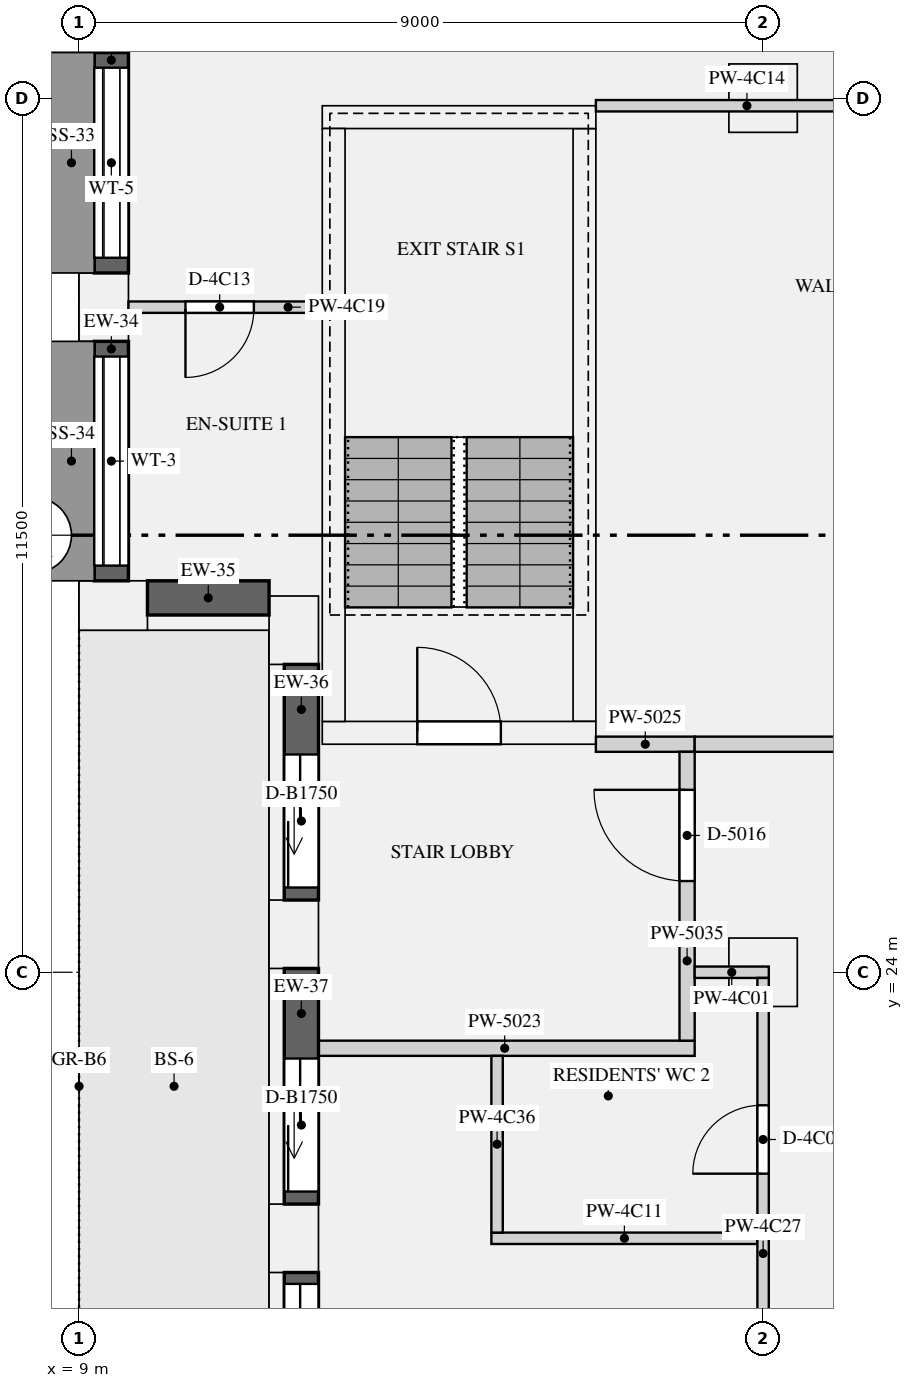
"""IFC4 building model, lengths in metres.
Left out: names, types, materials, properties, quantities, classifications, styles, units other than length and angle.
Written with IfcOpenShell. Run it as: python <this file> out.ifc"""

import sys

from ifc_helpers import new_model, si_unit, direction, frame, frame_2d, origin, origin_2d, place, context, subcontext, project, spatial, rectangle, extrude, element, fill, save


model = new_model("IFC4")
c1 = context("Model", 3, precision=1e-05, world=origin(), true_north=direction((0.0, 1.0)))
c2 = subcontext(c1, "Body", "Model", "MODEL_VIEW")
j1 = project(units=[si_unit("LENGTHUNIT", "METRE"), si_unit("PLANEANGLEUNIT", "RADIAN")], contexts=[c1])
p1 = place(None, origin())
s1 = spatial("IfcSite", under=j1, at=p1, CompositionType="ELEMENT")
p2 = place(p1, origin())
s2 = spatial("IfcBuilding", under=s1, at=p2, CompositionType="ELEMENT")
p3 = place(p2, frame((0.0, 0.0, 216.9)))
s3 = spatial("IfcBuildingStorey", under=s2, at=p3, CompositionType="ELEMENT", Elevation=216.9)
for number, where, z_axis, x_axis in (
    (1, (9.325, 32.75, 0.0), (0.0, 0.0, 1.0), (0.0, -1.0, 0.0)),
    (2, (9.45, 28.825, 0.0), (0.0, 0.0, 1.0), (1.0, 0.0, 0.0)),
    (3, (11.825, 28.5, 0.0), (0.0, 0.0, 1.0), (0.0, -1.0, 0.0)),
    (4, (11.825, 24.5, 0.0), (0.0, 0.0, 1.0), (0.0, -1.0, 0.0)),
    (5, (11.825, 20.5, 0.0), (0.0, 0.0, 1.0), (0.0, -1.0, 0.0)),
):
    element("IfcColumn", number, at=place(p3, frame(where, z_axis=z_axis, x_axis=x_axis)), inside=s3, PredefinedType="USERDEFINED", context=c2, shape_type="SweptSolid", body=[
        extrude(rectangle(XDim=0.9, YDim=0.65, at=origin_2d()), origin(), (0.0, 0.0, 1.0), 3.15),
    ])
for number, where, z_axis, x_axis in (
    (6, (18.0, 24.0, 0.0), (0.0, 0.0, 1.0), (1.0, 0.0, 0.0)),
    (7, (18.0, 35.5, 0.0), (0.0, 0.0, 1.0), (1.0, 0.0, 0.0)),
):
    element("IfcColumn", number, at=place(p3, frame(where, z_axis=z_axis, x_axis=x_axis)), inside=s3, PredefinedType="COLUMN", context=c2, shape_type="SweptSolid", body=[
        extrude(rectangle(XDim=0.9, YDim=0.9, at=origin_2d()), origin(), (0.0, 0.0, 1.0), 3.15),
    ])
p4 = place(p3, frame((12.2, 27.15, 0.0), z_axis=(0.0, 0.0, 1.0), x_axis=(1.0, 0.0, 0.0)))
e8 = element("IfcWall", 8, at=p4, inside=s3, PredefinedType="SHEAR", context=c2, shape_type="SweptSolid", body=[
    extrude(rectangle(XDim=3.6, YDim=0.3, at=frame_2d((1.8, 0.0))), origin(), (0.0, 0.0, 1.0), 3.15),
])
p5 = place(p4, frame((1.25, 0.0, 0.0)))
e9 = element("IfcOpeningElement", 9, at=p5, cuts=e8, PredefinedType="OPENING", context=c2, shape_type="SweptSolid", body=[
    extrude(rectangle(XDim=1.1, YDim=2.1, at=frame_2d((0.55, 1.05))), frame((0.0, 0.16, 0.0), z_axis=(0.0, -1.0, 0.0), x_axis=(1.0, 0.0, 0.0)), (0.0, 0.0, 1.0), 0.32),
])
p6 = place(p3, frame((12.2, 35.25, 0.0), z_axis=(0.0, 0.0, 1.0), x_axis=(1.0, 0.0, 0.0)))
e10 = element("IfcWall", 10, at=p6, inside=s3, PredefinedType="SHEAR", context=c2, shape_type="SweptSolid", body=[
    extrude(rectangle(XDim=3.6, YDim=0.3, at=frame_2d((1.8, 0.0))), origin(), (0.0, 0.0, 1.0), 3.15),
])
for number, where, z_axis, x_axis in (
    (11, (12.35, 27.3, 0.0), (0.0, 0.0, 1.0), (0.0, 1.0, 0.0)),
    (12, (15.65, 27.3, 0.0), (0.0, 0.0, 1.0), (0.0, 1.0, 0.0)),
):
    element("IfcWall", number, at=place(p3, frame(where, z_axis=z_axis, x_axis=x_axis)), inside=s3, PredefinedType="SHEAR", context=c2, shape_type="SweptSolid", body=[
        extrude(rectangle(XDim=7.8, YDim=0.3, at=frame_2d((3.9, 0.0))), origin(), (0.0, 0.0, 1.0), 3.15),
    ])
p7 = place(p3, frame((9.425, 36.1, 0.9), z_axis=(0.0, 0.0, 1.0), x_axis=(0.0, -1.0, 0.0)))
e13 = element("IfcWall", 13, at=p7, inside=s3, PredefinedType="SOLIDWALL", context=c2, shape_type="SweptSolid", body=[
    extrude(rectangle(XDim=2.9, YDim=0.45, at=frame_2d((1.45, 0.0))), origin(), (0.0, 0.0, 1.0), 1.93),
])
p8 = place(p7, frame((0.2, 0.0, 0.15)))
e14 = element("IfcOpeningElement", 14, at=p8, cuts=e13, PredefinedType="OPENING", context=c2, shape_type="SweptSolid", body=[
    extrude(rectangle(XDim=2.5, YDim=1.5, at=frame_2d((1.25, 0.75))), frame((0.0, 0.235, 0.0), z_axis=(0.0, -1.0, 0.0), x_axis=(1.0, 0.0, 0.0)), (0.0, 0.0, 1.0), 0.47),
])
p9 = place(p3, frame((9.425, 32.3, 0.9), z_axis=(0.0, 0.0, 1.0), x_axis=(0.0, -1.0, 0.0)))
e15 = element("IfcWall", 15, at=p9, inside=s3, PredefinedType="SOLIDWALL", context=c2, shape_type="SweptSolid", body=[
    extrude(rectangle(XDim=3.15, YDim=0.45, at=frame_2d((1.575, 0.0))), origin(), (0.0, 0.0, 1.0), 1.93),
])
p10 = place(p9, frame((0.2, 0.0, 0.15)))
e16 = element("IfcOpeningElement", 16, at=p10, cuts=e15, PredefinedType="OPENING", context=c2, shape_type="SweptSolid", body=[
    extrude(rectangle(XDim=2.75, YDim=1.5, at=frame_2d((1.375, 0.75))), frame((0.0, 0.235, 0.0), z_axis=(0.0, -1.0, 0.0), x_axis=(1.0, 0.0, 0.0)), (0.0, 0.0, 1.0), 0.47),
])
p11 = place(p3, frame((9.9, 28.925, 0.9), z_axis=(0.0, 0.0, 1.0), x_axis=(1.0, 0.0, 0.0)))
e17 = element("IfcWall", 17, at=p11, inside=s3, PredefinedType="SOLIDWALL", context=c2, shape_type="SweptSolid", body=[
    extrude(rectangle(XDim=1.6, YDim=0.45, at=frame_2d((0.8, 0.0))), origin(), (0.0, 0.0, 1.0), 1.93),
])
p12 = place(p3, frame((11.925, 28.05, 0.0), z_axis=(0.0, 0.0, 1.0), x_axis=(0.0, -1.0, 0.0)))
e18 = element("IfcWall", 18, at=p12, inside=s3, PredefinedType="SOLIDWALL", context=c2, shape_type="SweptSolid", body=[
    extrude(rectangle(XDim=3.1, YDim=0.45, at=frame_2d((1.55, 0.0))), origin(), (0.0, 0.0, 1.0), 2.83),
])
p13 = place(p12, frame((1.185, 0.0, 0.0)))
e19 = element("IfcOpeningElement", 19, at=p13, cuts=e18, PredefinedType="OPENING", context=c2, shape_type="SweptSolid", body=[
    extrude(rectangle(XDim=1.75, YDim=2.3, at=frame_2d((0.875, 1.15))), frame((0.0, 0.235, 0.0), z_axis=(0.0, -1.0, 0.0), x_axis=(1.0, 0.0, 0.0)), (0.0, 0.0, 1.0), 0.47),
])
p14 = place(p3, frame((11.925, 24.05, 0.0), z_axis=(0.0, 0.0, 1.0), x_axis=(0.0, -1.0, 0.0)))
e20 = element("IfcWall", 20, at=p14, inside=s3, PredefinedType="SOLIDWALL", context=c2, shape_type="SweptSolid", body=[
    extrude(rectangle(XDim=3.1, YDim=0.45, at=frame_2d((1.55, 0.0))), origin(), (0.0, 0.0, 1.0), 2.83),
])
p15 = place(p14, frame((1.185, 0.0, 0.0)))
e21 = element("IfcOpeningElement", 21, at=p15, cuts=e20, PredefinedType="OPENING", context=c2, shape_type="SweptSolid", body=[
    extrude(rectangle(XDim=1.75, YDim=2.3, at=frame_2d((0.875, 1.15))), frame((0.0, 0.235, 0.0), z_axis=(0.0, -1.0, 0.0), x_axis=(1.0, 0.0, 0.0)), (0.0, 0.0, 1.0), 0.47),
])
p16 = place(p3, frame((11.925, 20.05, 0.0), z_axis=(0.0, 0.0, 1.0), x_axis=(0.0, -1.0, 0.0)))
e22 = element("IfcWall", 22, at=p16, inside=s3, PredefinedType="SOLIDWALL", context=c2, shape_type="SweptSolid", body=[
    extrude(rectangle(XDim=3.55, YDim=0.45, at=frame_2d((1.775, 0.0))), origin(), (0.0, 0.0, 1.0), 2.83),
])
p17 = place(p16, frame((0.15, 0.0, 0.0)))
e23 = element("IfcOpeningElement", 23, at=p17, cuts=e22, PredefinedType="OPENING", context=c2, shape_type="SweptSolid", body=[
    extrude(rectangle(XDim=3.25, YDim=2.3, at=frame_2d((1.625, 1.15))), frame((0.0, 0.235, 0.0), z_axis=(0.0, -1.0, 0.0), x_axis=(1.0, 0.0, 0.0)), (0.0, 0.0, 1.0), 0.47),
])
p18 = place(p3, frame((12.1, 23.0, 0.0), z_axis=(0.0, 0.0, 1.0), x_axis=(1.0, 0.0, 0.0)))
e24 = element("IfcWall", 24, at=p18, inside=s3, PredefinedType="PARTITIONING", context=c2, shape_type="SweptSolid", body=[
    extrude(rectangle(XDim=5.0, YDim=0.2, at=frame_2d((2.5, 0.0))), origin(), (0.0, 0.0, 1.0), 2.83),
])
p19 = place(p3, frame((15.8, 27.0, 0.0), z_axis=(0.0, 0.0, 1.0), x_axis=(1.0, 0.0, 0.0)))
e25 = element("IfcWall", 25, at=p19, inside=s3, PredefinedType="PARTITIONING", context=c2, shape_type="SweptSolid", body=[
    extrude(rectangle(XDim=1.3, YDim=0.2, at=frame_2d((0.65, 0.0))), origin(), (0.0, 0.0, 1.0), 2.83),
])
p20 = place(p3, frame((17.0, 23.1, 0.0), z_axis=(0.0, 0.0, 1.0), x_axis=(0.0, 1.0, 0.0)))
e26 = element("IfcWall", 26, at=p20, inside=s3, PredefinedType="PARTITIONING", context=c2, shape_type="SweptSolid", body=[
    extrude(rectangle(XDim=3.8, YDim=0.2, at=frame_2d((1.9, 0.0))), origin(), (0.0, 0.0, 1.0), 2.83),
])
p21 = place(p20, frame((2.1, 0.0, 0.0)))
e27 = element("IfcOpeningElement", 27, at=p21, cuts=e26, PredefinedType="OPENING", context=c2, shape_type="SweptSolid", body=[
    extrude(rectangle(XDim=1.2, YDim=2.1, at=frame_2d((0.6, 1.05))), frame((0.0, 0.11, 0.0), z_axis=(0.0, -1.0, 0.0), x_axis=(1.0, 0.0, 0.0)), (0.0, 0.0, 1.0), 0.22),
])
p22 = place(p3, frame((17.1, 24.0, 0.0), z_axis=(0.0, 0.0, 1.0), x_axis=(1.0, 0.0, 0.0)))
e28 = element("IfcWall", 28, at=p22, inside=s3, PredefinedType="PARTITIONING", context=c2, shape_type="SweptSolid", body=[
    extrude(rectangle(XDim=0.975, YDim=0.15, at=frame_2d((0.487, 0.0))), origin(), (0.0, 0.0, 1.0), 2.83),
])
p23 = place(p3, frame((17.1, 27.0, 0.0), z_axis=(0.0, 0.0, 1.0), x_axis=(1.0, 0.0, 0.0)))
e29 = element("IfcWall", 29, at=p23, inside=s3, PredefinedType="PARTITIONING", context=c2, shape_type="SweptSolid", body=[
    extrude(rectangle(XDim=6.975, YDim=0.2, at=frame_2d((3.487, 0.0))), origin(), (0.0, 0.0, 1.0), 2.83),
])
p24 = place(p3, frame((14.425, 20.5, 0.0), z_axis=(0.0, 0.0, 1.0), x_axis=(1.0, 0.0, 0.0)))
e30 = element("IfcWall", 30, at=p24, inside=s3, PredefinedType="PARTITIONING", context=c2, shape_type="SweptSolid", body=[
    extrude(rectangle(XDim=3.5, YDim=0.15, at=frame_2d((1.75, 0.0))), origin(), (0.0, 0.0, 1.0), 2.83),
])
p25 = place(p3, frame((15.8, 35.4, 0.0), z_axis=(0.0, 0.0, 1.0), x_axis=(1.0, 0.0, 0.0)))
e31 = element("IfcWall", 31, at=p25, inside=s3, PredefinedType="PARTITIONING", context=c2, shape_type="SweptSolid", body=[
    extrude(rectangle(XDim=11.2, YDim=0.15, at=frame_2d((5.6, 0.0))), origin(), (0.0, 0.0, 1.0), 2.83),
])
p26 = place(p25, frame((8.725, 0.0, 0.0)))
e32 = element("IfcOpeningElement", 32, at=p26, cuts=e31, PredefinedType="OPENING", context=c2, shape_type="SweptSolid", body=[
    extrude(rectangle(XDim=1.5, YDim=2.1, at=frame_2d((0.75, 1.05))), frame((0.0, 0.085, 0.0), z_axis=(0.0, -1.0, 0.0), x_axis=(1.0, 0.0, 0.0)), (0.0, 0.0, 1.0), 0.17),
])
p27 = place(p25, frame((3.975, 0.0, 0.0)))
e33 = element("IfcOpeningElement", 33, at=p27, cuts=e31, PredefinedType="OPENING", context=c2, shape_type="SweptSolid", body=[
    extrude(rectangle(XDim=0.9, YDim=2.1, at=frame_2d((0.45, 1.05))), frame((0.0, 0.085, 0.0), z_axis=(0.0, -1.0, 0.0), x_axis=(1.0, 0.0, 0.0)), (0.0, 0.0, 1.0), 0.17),
])
p28 = place(p3, frame((9.65, 32.75, 0.0), z_axis=(0.0, 0.0, 1.0), x_axis=(1.0, 0.0, 0.0)))
e34 = element("IfcWall", 34, at=p28, inside=s3, PredefinedType="PARTITIONING", context=c2, shape_type="SweptSolid", body=[
    extrude(rectangle(XDim=2.55, YDim=0.15, at=frame_2d((1.275, 0.0))), origin(), (0.0, 0.0, 1.0), 2.83),
])
p29 = place(p28, frame((0.75, 0.0, 0.0)))
e35 = element("IfcOpeningElement", 35, at=p29, cuts=e34, PredefinedType="OPENING", context=c2, shape_type="SweptSolid", body=[
    extrude(rectangle(XDim=0.9, YDim=2.1, at=frame_2d((0.45, 1.05))), frame((0.0, 0.085, 0.0), z_axis=(0.0, -1.0, 0.0), x_axis=(1.0, 0.0, 0.0)), (0.0, 0.0, 1.0), 0.17),
])
p30 = place(p3, frame((18.0, 16.1, 0.0), z_axis=(0.0, 0.0, 1.0), x_axis=(0.0, 1.0, 0.0)))
e36 = element("IfcWall", 36, at=p30, inside=s3, PredefinedType="PARTITIONING", context=c2, shape_type="SweptSolid", body=[
    extrude(rectangle(XDim=7.825, YDim=0.15, at=frame_2d((3.913, 0.0))), origin(), (0.0, 0.0, 1.0), 2.83),
])
p31 = place(p30, frame((1.65, 0.0, 0.0)))
e37 = element("IfcOpeningElement", 37, at=p31, cuts=e36, PredefinedType="OPENING", context=c2, shape_type="SweptSolid", body=[
    extrude(rectangle(XDim=1.5, YDim=2.1, at=frame_2d((0.75, 1.05))), frame((0.0, 0.085, 0.0), z_axis=(0.0, -1.0, 0.0), x_axis=(1.0, 0.0, 0.0)), (0.0, 0.0, 1.0), 0.17),
])
p32 = place(p30, frame((5.25, 0.0, 0.0)))
e38 = element("IfcOpeningElement", 38, at=p32, cuts=e36, PredefinedType="OPENING", context=c2, shape_type="SweptSolid", body=[
    extrude(rectangle(XDim=0.9, YDim=2.1, at=frame_2d((0.45, 1.05))), frame((0.0, 0.085, 0.0), z_axis=(0.0, -1.0, 0.0), x_axis=(1.0, 0.0, 0.0)), (0.0, 0.0, 1.0), 0.17),
])
p33 = place(p3, frame((14.5, 20.575, 0.0), z_axis=(0.0, 0.0, 1.0), x_axis=(0.0, 1.0, 0.0)))
e39 = element("IfcWall", 39, at=p33, inside=s3, PredefinedType="PARTITIONING", context=c2, shape_type="SweptSolid", body=[
    extrude(rectangle(XDim=2.325, YDim=0.15, at=frame_2d((1.163, 0.0))), origin(), (0.0, 0.0, 1.0), 2.83),
])
p34 = place(p8, origin())
e40 = element("IfcWindow", 40, at=p34, inside=s3, PartitioningType="SINGLE_PANEL", PredefinedType="WINDOW", context=c2, shape_type="SweptSolid", body=[
    extrude(rectangle(XDim=2.5, YDim=1.5, at=frame_2d((1.25, 0.75))), frame((0.0, -0.065, 0.0), z_axis=(0.0, -1.0, 0.0), x_axis=(1.0, 0.0, 0.0)), (0.0, 0.0, 1.0), 0.06),
])
fill(e14, e40)
p35 = place(p10, origin())
e41 = element("IfcWindow", 41, at=p35, inside=s3, PartitioningType="SINGLE_PANEL", PredefinedType="WINDOW", context=c2, shape_type="SweptSolid", body=[
    extrude(rectangle(XDim=2.75, YDim=1.5, at=frame_2d((1.375, 0.75))), frame((0.0, -0.065, 0.0), z_axis=(0.0, -1.0, 0.0), x_axis=(1.0, 0.0, 0.0)), (0.0, 0.0, 1.0), 0.06),
])
fill(e16, e41)
p36 = place(p13, frame((1.75, -0.19, 0.0), z_axis=(0.0, 0.0, 1.0), x_axis=(-1.0, 0.0, 0.0)))
e42 = element("IfcDoor", 42, at=p36, inside=s3, OperationType="SLIDING_TO_LEFT", PredefinedType="DOOR", context=c2, shape_type="SweptSolid", body=[
    extrude(rectangle(XDim=1.75, YDim=2.3, at=frame_2d((0.875, 1.15))), frame((0.0, -0.07, 0.0), z_axis=(0.0, -1.0, 0.0), x_axis=(1.0, 0.0, 0.0)), (0.0, 0.0, 1.0), 0.05),
])
fill(e19, e42)
p37 = place(p15, origin())
e43 = element("IfcDoor", 43, at=p37, inside=s3, OperationType="SLIDING_TO_LEFT", PredefinedType="DOOR", context=c2, shape_type="SweptSolid", body=[
    extrude(rectangle(XDim=1.75, YDim=2.3, at=frame_2d((0.875, 1.15))), frame((0.0, -0.07, 0.0), z_axis=(0.0, -1.0, 0.0), x_axis=(1.0, 0.0, 0.0)), (0.0, 0.0, 1.0), 0.05),
])
fill(e21, e43)
p38 = place(p17, origin())
e44 = element("IfcDoor", 44, at=p38, inside=s3, OperationType="SLIDING_TO_LEFT", PredefinedType="DOOR", context=c2, shape_type="SweptSolid", body=[
    extrude(rectangle(XDim=3.25, YDim=2.3, at=frame_2d((1.625, 1.15))), frame((0.0, -0.07, 0.0), z_axis=(0.0, -1.0, 0.0), x_axis=(1.0, 0.0, 0.0)), (0.0, 0.0, 1.0), 0.05),
])
fill(e23, e44)
p39 = place(p5, origin())
e45 = element("IfcDoor", 45, at=p39, inside=s3, OperationType="SINGLE_SWING_LEFT", PredefinedType="DOOR", context=c2, shape_type="SweptSolid", body=[
    extrude(rectangle(XDim=1.1, YDim=2.1, at=frame_2d((0.55, 1.05))), frame((0.0, 0.025, 0.0), z_axis=(0.0, -1.0, 0.0), x_axis=(1.0, 0.0, 0.0)), (0.0, 0.0, 1.0), 0.05),
])
fill(e9, e45)
p40 = place(p21, origin())
e46 = element("IfcDoor", 46, at=p40, inside=s3, OperationType="SINGLE_SWING_RIGHT", PredefinedType="DOOR", context=c2, shape_type="SweptSolid", body=[
    extrude(rectangle(XDim=1.2, YDim=2.1, at=frame_2d((0.6, 1.05))), frame((0.0, 0.025, 0.0), z_axis=(0.0, -1.0, 0.0), x_axis=(1.0, 0.0, 0.0)), (0.0, 0.0, 1.0), 0.05),
])
fill(e27, e46)
p41 = place(p32, origin())
e47 = element("IfcDoor", 47, at=p41, inside=s3, OperationType="SINGLE_SWING_LEFT", PredefinedType="DOOR", context=c2, shape_type="SweptSolid", body=[
    extrude(rectangle(XDim=0.9, YDim=2.1, at=frame_2d((0.45, 1.05))), frame((0.0, 0.025, 0.0), z_axis=(0.0, -1.0, 0.0), x_axis=(1.0, 0.0, 0.0)), (0.0, 0.0, 1.0), 0.05),
])
fill(e38, e47)
p42 = place(p29, frame((0.9, 0.0, 0.0), z_axis=(0.0, 0.0, 1.0), x_axis=(-1.0, 0.0, 0.0)))
e48 = element("IfcDoor", 48, at=p42, inside=s3, OperationType="SINGLE_SWING_RIGHT", PredefinedType="DOOR", context=c2, shape_type="SweptSolid", body=[
    extrude(rectangle(XDim=0.9, YDim=2.1, at=frame_2d((0.45, 1.05))), frame((0.0, 0.025, 0.0), z_axis=(0.0, -1.0, 0.0), x_axis=(1.0, 0.0, 0.0)), (0.0, 0.0, 1.0), 0.05),
])
fill(e35, e48)
save(model, sys.argv[1])
